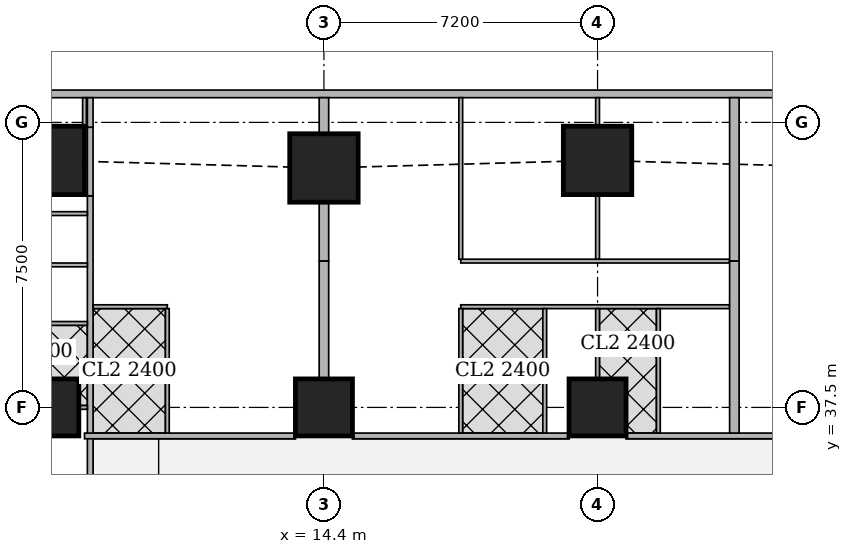
"""IFC4 building model, lengths in metres.
Left out: names, types, materials, properties, quantities, classifications, styles, units other than length and angle.
Written with IfcOpenShell. Run it as: python <this file> out.ifc"""

import sys

from ifc_helpers import new_model, si_unit, direction, frame, frame_2d, origin, origin_2d, place, context, subcontext, project, spatial, rectangle, extrude, element, fill, save


model = new_model("IFC4")
c1 = context("Model", 3, precision=1e-05, world=origin(), true_north=direction((0.0, 1.0)))
c2 = subcontext(c1, "Body", "Model", "MODEL_VIEW")
j1 = project(units=[si_unit("LENGTHUNIT", "METRE"), si_unit("PLANEANGLEUNIT", "RADIAN")], contexts=[c1])
p1 = place(None, origin())
s1 = spatial("IfcSite", under=j1, at=p1, CompositionType="ELEMENT")
p2 = place(p1, origin())
s2 = spatial("IfcBuilding", under=s1, at=p2, CompositionType="ELEMENT")
p3 = place(p2, frame((0.0, 0.0, 147.05)))
s3 = spatial("IfcBuildingStorey", under=s2, at=p3, CompositionType="ELEMENT", Elevation=147.05)
for number, where, z_axis, x_axis in (
    (1, (7.2, 37.5, 0.0), (0.0, 0.0, 1.0), (1.0, 0.0, 0.0)),
    (2, (14.4, 37.5, 0.0), (0.0, 0.0, 1.0), (1.0, 0.0, 0.0)),
    (3, (21.6, 37.5, 0.0), (0.0, 0.0, 1.0), (1.0, 0.0, 0.0)),
):
    element("IfcColumn", number, at=place(p3, frame(where, z_axis=z_axis, x_axis=x_axis)), inside=s3, PredefinedType="COLUMN", context=c2, shape_type="SweptSolid", body=[
        extrude(rectangle(XDim=1.5, YDim=1.5, at=origin_2d()), origin(), (0.0, 0.0, 1.0), 3.75),
    ])
for number, where, z_axis, x_axis in (
    (4, (7.2, 44.0, 0.0), (0.0, 0.0, 1.0), (1.0, 0.0, 0.0)),
    (5, (14.4, 43.8, 0.0), (0.0, 0.0, 1.0), (1.0, 0.0, 0.0)),
    (6, (21.6, 44.0, 0.0), (0.0, 0.0, 1.0), (1.0, 0.0, 0.0)),
):
    element("IfcColumn", number, at=place(p3, frame(where, z_axis=z_axis, x_axis=x_axis)), inside=s3, PredefinedType="COLUMN", context=c2, shape_type="SweptSolid", body=[
        extrude(rectangle(XDim=1.8, YDim=1.8, at=origin_2d()), origin(), (0.0, 0.0, 1.0), 3.75),
    ])
p4 = place(p3, frame((40.106, 45.75, 0.0), z_axis=(0.0, 0.0, 1.0), x_axis=(-1.0, 0.0, 0.0)))
e7 = element("IfcWall", 7, at=p4, inside=s3, PredefinedType="SOLIDWALL", context=c2, shape_type="SweptSolid", body=[
    extrude(rectangle(XDim=37.943, YDim=0.2, at=frame_2d((18.971, 0.0))), origin(), (0.0, 0.0, 1.0), 3.5),
])
p5 = place(p4, frame((8.606, 0.0, 0.9)))
e8 = element("IfcOpeningElement", 8, at=p5, cuts=e7, PredefinedType="OPENING", context=c2, shape_type="SweptSolid", body=[
    extrude(rectangle(XDim=1.8, YDim=1.5, at=frame_2d((0.9, 0.75))), frame((0.0, 0.11, 0.0), z_axis=(0.0, -1.0, 0.0), x_axis=(1.0, 0.0, 0.0)), (0.0, 0.0, 1.0), 0.22),
])
p6 = place(p4, frame((12.206, 0.0, 0.9)))
e9 = element("IfcOpeningElement", 9, at=p6, cuts=e7, PredefinedType="OPENING", context=c2, shape_type="SweptSolid", body=[
    extrude(rectangle(XDim=1.8, YDim=1.5, at=frame_2d((0.9, 0.75))), frame((0.0, 0.11, 0.0), z_axis=(0.0, -1.0, 0.0), x_axis=(1.0, 0.0, 0.0)), (0.0, 0.0, 1.0), 0.22),
])
p7 = place(p4, frame((15.806, 0.0, 0.9)))
e10 = element("IfcOpeningElement", 10, at=p7, cuts=e7, PredefinedType="OPENING", context=c2, shape_type="SweptSolid", body=[
    extrude(rectangle(XDim=1.8, YDim=1.5, at=frame_2d((0.9, 0.75))), frame((0.0, 0.11, 0.0), z_axis=(0.0, -1.0, 0.0), x_axis=(1.0, 0.0, 0.0)), (0.0, 0.0, 1.0), 0.22),
])
p8 = place(p4, frame((19.406, 0.0, 0.9)))
e11 = element("IfcOpeningElement", 11, at=p8, cuts=e7, PredefinedType="OPENING", context=c2, shape_type="SweptSolid", body=[
    extrude(rectangle(XDim=1.8, YDim=1.5, at=frame_2d((0.9, 0.75))), frame((0.0, 0.11, 0.0), z_axis=(0.0, -1.0, 0.0), x_axis=(1.0, 0.0, 0.0)), (0.0, 0.0, 1.0), 0.22),
])
p9 = place(p4, frame((23.006, 0.0, 0.9)))
e12 = element("IfcOpeningElement", 12, at=p9, cuts=e7, PredefinedType="OPENING", context=c2, shape_type="SweptSolid", body=[
    extrude(rectangle(XDim=1.8, YDim=1.5, at=frame_2d((0.9, 0.75))), frame((0.0, 0.11, 0.0), z_axis=(0.0, -1.0, 0.0), x_axis=(1.0, 0.0, 0.0)), (0.0, 0.0, 1.0), 0.22),
])
p10 = place(p4, frame((26.606, 0.0, 0.9)))
e13 = element("IfcOpeningElement", 13, at=p10, cuts=e7, PredefinedType="OPENING", context=c2, shape_type="SweptSolid", body=[
    extrude(rectangle(XDim=1.8, YDim=1.5, at=frame_2d((0.9, 0.75))), frame((0.0, 0.11, 0.0), z_axis=(0.0, -1.0, 0.0), x_axis=(1.0, 0.0, 0.0)), (0.0, 0.0, 1.0), 0.22),
])
p11 = place(p3, frame((8.25, 1.957, 0.0), z_axis=(0.0, 0.0, 1.0), x_axis=(0.0, 1.0, 0.0)))
e14 = element("IfcWall", 14, at=p11, inside=s3, PredefinedType="SOLIDWALL", context=c2, shape_type="SweptSolid", body=[
    extrude(rectangle(XDim=41.111, YDim=0.15, at=frame_2d((20.556, 0.0))), origin(), (0.0, 0.0, 1.0), 3.5),
])
p12 = place(p11, frame((14.418, 0.0, 0.0)))
e15 = element("IfcOpeningElement", 15, at=p12, cuts=e14, PredefinedType="OPENING", context=c2, shape_type="SweptSolid", body=[
    extrude(rectangle(XDim=1.0, YDim=2.1, at=frame_2d((0.5, 1.05))), frame((0.0, 0.085, 0.0), z_axis=(0.0, -1.0, 0.0), x_axis=(1.0, 0.0, 0.0)), (0.0, 0.0, 1.0), 0.17),
])
p13 = place(p11, frame((18.168, 0.0, 0.0)))
e16 = element("IfcOpeningElement", 16, at=p13, cuts=e14, PredefinedType="OPENING", context=c2, shape_type="SweptSolid", body=[
    extrude(rectangle(XDim=1.0, YDim=2.1, at=frame_2d((0.5, 1.05))), frame((0.0, 0.085, 0.0), z_axis=(0.0, -1.0, 0.0), x_axis=(1.0, 0.0, 0.0)), (0.0, 0.0, 1.0), 0.17),
])
p14 = place(p11, frame((33.168, 0.0, 0.0)))
e17 = element("IfcOpeningElement", 17, at=p14, cuts=e14, PredefinedType="OPENING", context=c2, shape_type="SweptSolid", body=[
    extrude(rectangle(XDim=1.0, YDim=2.1, at=frame_2d((0.5, 1.05))), frame((0.0, 0.085, 0.0), z_axis=(0.0, -1.0, 0.0), x_axis=(1.0, 0.0, 0.0)), (0.0, 0.0, 1.0), 0.17),
])
p15 = place(p3, frame((8.25, 43.068, 0.0), z_axis=(0.0, 0.0, 1.0), x_axis=(0.0, 1.0, 0.0)))
e18 = element("IfcWall", 18, at=p15, inside=s3, PredefinedType="SOLIDWALL", context=c2, shape_type="SweptSolid", body=[
    extrude(rectangle(XDim=1.805, YDim=0.15, at=frame_2d((0.902, 0.0))), origin(), (0.0, 0.0, 1.0), 2.1),
])
p16 = place(p3, frame((8.25, 44.873, 0.0), z_axis=(0.0, 0.0, 1.0), x_axis=(0.0, 1.0, 0.0)))
e19 = element("IfcWall", 19, at=p16, inside=s3, PredefinedType="SOLIDWALL", context=c2, shape_type="SweptSolid", body=[
    extrude(rectangle(XDim=0.777, YDim=0.15, at=frame_2d((0.388, 0.0))), origin(), (0.0, 0.0, 1.0), 3.5),
])
p17 = place(p3, frame((8.1, 36.75, 0.0), z_axis=(0.0, 0.0, 1.0), x_axis=(1.0, 0.0, 0.0)))
e20 = element("IfcWall", 20, at=p17, inside=s3, PredefinedType="SOLIDWALL", context=c2, shape_type="SweptSolid", body=[
    extrude(rectangle(XDim=5.549, YDim=0.15, at=frame_2d((2.774, 0.0))), origin(), (0.0, 0.0, 1.0), 3.5),
])
p18 = place(p17, frame((3.739, 0.0, 0.0)))
e21 = element("IfcOpeningElement", 21, at=p18, cuts=e20, PredefinedType="OPENING", context=c2, shape_type="SweptSolid", body=[
    extrude(rectangle(XDim=1.0, YDim=2.1, at=frame_2d((0.5, 1.05))), frame((0.0, 0.085, 0.0), z_axis=(0.0, -1.0, 0.0), x_axis=(1.0, 0.0, 0.0)), (0.0, 0.0, 1.0), 0.17),
])
p19 = place(p3, frame((15.151, 36.75, 0.0), z_axis=(0.0, 0.0, 1.0), x_axis=(1.0, 0.0, 0.0)))
e22 = element("IfcWall", 22, at=p19, inside=s3, PredefinedType="SOLIDWALL", context=c2, shape_type="SweptSolid", body=[
    extrude(rectangle(XDim=5.698, YDim=0.15, at=frame_2d((2.849, 0.0))), origin(), (0.0, 0.0, 1.0), 3.5),
])
p20 = place(p19, frame((0.749, 0.0, 0.0)))
e23 = element("IfcOpeningElement", 23, at=p20, cuts=e22, PredefinedType="OPENING", context=c2, shape_type="SweptSolid", body=[
    extrude(rectangle(XDim=1.0, YDim=2.1, at=frame_2d((0.5, 1.05))), frame((0.0, 0.085, 0.0), z_axis=(0.0, -1.0, 0.0), x_axis=(1.0, 0.0, 0.0)), (0.0, 0.0, 1.0), 0.17),
])
p21 = place(p3, frame((22.351, 36.75, 0.0), z_axis=(0.0, 0.0, 1.0), x_axis=(1.0, 0.0, 0.0)))
e24 = element("IfcWall", 24, at=p21, inside=s3, PredefinedType="SOLIDWALL", context=c2, shape_type="SweptSolid", body=[
    extrude(rectangle(XDim=5.698, YDim=0.15, at=frame_2d((2.849, 0.0))), origin(), (0.0, 0.0, 1.0), 3.5),
])
p22 = place(p21, frame((4.032, 0.0, 0.0)))
e25 = element("IfcOpeningElement", 25, at=p22, cuts=e24, PredefinedType="OPENING", context=c2, shape_type="SweptSolid", body=[
    extrude(rectangle(XDim=1.0, YDim=2.1, at=frame_2d((0.5, 1.05))), frame((0.0, 0.085, 0.0), z_axis=(0.0, -1.0, 0.0), x_axis=(1.0, 0.0, 0.0)), (0.0, 0.0, 1.0), 0.17),
])
p23 = place(p3, frame((8.1, 45.65, 0.0), z_axis=(0.0, 0.0, 1.0), x_axis=(0.0, -1.0, 0.0)))
e26 = element("IfcWall", 26, at=p23, inside=s3, PredefinedType="PARTITIONING", context=c2, shape_type="SweptSolid", body=[
    extrude(rectangle(XDim=0.749, YDim=0.1, at=frame_2d((0.375, 0.0))), origin(), (0.0, 0.0, 1.0), 3.5),
])
p24 = place(p3, frame((7.951, 37.5, 0.0), z_axis=(0.0, 0.0, 1.0), x_axis=(1.0, 0.0, 0.0)))
e27 = element("IfcWall", 27, at=p24, inside=s3, PredefinedType="PARTITIONING", context=c2, shape_type="SweptSolid", body=[
    extrude(rectangle(XDim=0.224, YDim=0.1, at=frame_2d((0.112, 0.0))), origin(), (0.0, 0.0, 1.0), 3.5),
])
for number, where, z_axis, x_axis in (
    (28, (4.9, 41.25, 0.0), (0.0, 0.0, 1.0), (1.0, 0.0, 0.0)),
    (29, (4.9, 39.71, 0.0), (0.0, 0.0, 1.0), (1.0, 0.0, 0.0)),
):
    element("IfcWall", number, at=place(p3, frame(where, z_axis=z_axis, x_axis=x_axis)), inside=s3, PredefinedType="PARTITIONING", context=c2, shape_type="SweptSolid", body=[
        extrude(rectangle(XDim=3.275, YDim=0.1, at=frame_2d((1.638, 0.0))), origin(), (0.0, 0.0, 1.0), 3.5),
    ])
p25 = place(p3, frame((8.325, 40.15, 0.0), z_axis=(0.0, 0.0, 1.0), x_axis=(1.0, 0.0, 0.0)))
e30 = element("IfcWall", 30, at=p25, inside=s3, PredefinedType="PARTITIONING", context=c2, shape_type="SweptSolid", body=[
    extrude(rectangle(XDim=1.954, YDim=0.1, at=frame_2d((0.977, 0.0))), origin(), (0.0, 0.0, 1.0), 3.5),
])
p26 = place(p25, frame((0.475, 0.0, 0.0)))
e31 = element("IfcOpeningElement", 31, at=p26, cuts=e30, PredefinedType="OPENING", context=c2, shape_type="SweptSolid", body=[
    extrude(rectangle(XDim=0.9, YDim=2.1, at=frame_2d((0.45, 1.05))), frame((0.0, 0.06, 0.0), z_axis=(0.0, -1.0, 0.0), x_axis=(1.0, 0.0, 0.0)), (0.0, 0.0, 1.0), 0.12),
])
p27 = place(p3, frame((10.279, 36.825, 0.0), z_axis=(0.0, 0.0, 1.0), x_axis=(0.0, 1.0, 0.0)))
e32 = element("IfcWall", 32, at=p27, inside=s3, PredefinedType="PARTITIONING", context=c2, shape_type="SweptSolid", body=[
    extrude(rectangle(XDim=3.275, YDim=0.1, at=frame_2d((1.638, 0.0))), origin(), (0.0, 0.0, 1.0), 3.5),
])
p28 = place(p3, frame((18.0, 41.35, 0.0), z_axis=(0.0, 0.0, 1.0), x_axis=(1.0, 0.0, 0.0)))
e33 = element("IfcWall", 33, at=p28, inside=s3, PredefinedType="PARTITIONING", context=c2, shape_type="SweptSolid", body=[
    extrude(rectangle(XDim=7.075, YDim=0.1, at=frame_2d((3.538, 0.0))), origin(), (0.0, 0.0, 1.0), 3.5),
])
p29 = place(p28, frame((0.2, 0.0, 0.0)))
e34 = element("IfcOpeningElement", 34, at=p29, cuts=e33, PredefinedType="OPENING", context=c2, shape_type="SweptSolid", body=[
    extrude(rectangle(XDim=0.9, YDim=2.1, at=frame_2d((0.45, 1.05))), frame((0.0, 0.06, 0.0), z_axis=(0.0, -1.0, 0.0), x_axis=(1.0, 0.0, 0.0)), (0.0, 0.0, 1.0), 0.12),
])
p30 = place(p28, frame((3.8, 0.0, 0.0)))
e35 = element("IfcOpeningElement", 35, at=p30, cuts=e33, PredefinedType="OPENING", context=c2, shape_type="SweptSolid", body=[
    extrude(rectangle(XDim=0.9, YDim=2.1, at=frame_2d((0.45, 1.05))), frame((0.0, 0.06, 0.0), z_axis=(0.0, -1.0, 0.0), x_axis=(1.0, 0.0, 0.0)), (0.0, 0.0, 1.0), 0.12),
])
p31 = place(p3, frame((18.0, 40.15, 0.0), z_axis=(0.0, 0.0, 1.0), x_axis=(1.0, 0.0, 0.0)))
e36 = element("IfcWall", 36, at=p31, inside=s3, PredefinedType="PARTITIONING", context=c2, shape_type="SweptSolid", body=[
    extrude(rectangle(XDim=7.075, YDim=0.1, at=frame_2d((3.538, 0.0))), origin(), (0.0, 0.0, 1.0), 3.5),
])
p32 = place(p31, frame((0.655, 0.0, 0.0)))
e37 = element("IfcOpeningElement", 37, at=p32, cuts=e36, PredefinedType="OPENING", context=c2, shape_type="SweptSolid", body=[
    extrude(rectangle(XDim=0.9, YDim=2.1, at=frame_2d((0.45, 1.05))), frame((0.0, 0.06, 0.0), z_axis=(0.0, -1.0, 0.0), x_axis=(1.0, 0.0, 0.0)), (0.0, 0.0, 1.0), 0.12),
])
p33 = place(p31, frame((3.95, 0.0, 0.0)))
e38 = element("IfcOpeningElement", 38, at=p33, cuts=e36, PredefinedType="OPENING", context=c2, shape_type="SweptSolid", body=[
    extrude(rectangle(XDim=0.9, YDim=2.1, at=frame_2d((0.45, 1.05))), frame((0.0, 0.06, 0.0), z_axis=(0.0, -1.0, 0.0), x_axis=(1.0, 0.0, 0.0)), (0.0, 0.0, 1.0), 0.12),
])
p34 = place(p31, frame((2.455, 0.0, 0.0)))
e39 = element("IfcOpeningElement", 39, at=p34, cuts=e36, PredefinedType="OPENING", context=c2, shape_type="SweptSolid", body=[
    extrude(rectangle(XDim=0.9, YDim=2.1, at=frame_2d((0.45, 1.05))), frame((0.0, 0.06, 0.0), z_axis=(0.0, -1.0, 0.0), x_axis=(1.0, 0.0, 0.0)), (0.0, 0.0, 1.0), 0.12),
])
p35 = place(p31, frame((5.75, 0.0, 0.0)))
e40 = element("IfcOpeningElement", 40, at=p35, cuts=e36, PredefinedType="OPENING", context=c2, shape_type="SweptSolid", body=[
    extrude(rectangle(XDim=0.9, YDim=2.1, at=frame_2d((0.45, 1.05))), frame((0.0, 0.06, 0.0), z_axis=(0.0, -1.0, 0.0), x_axis=(1.0, 0.0, 0.0)), (0.0, 0.0, 1.0), 0.12),
])
p36 = place(p3, frame((18.0, 41.4, 0.0), z_axis=(0.0, 0.0, 1.0), x_axis=(0.0, 1.0, 0.0)))
e41 = element("IfcWall", 41, at=p36, inside=s3, PredefinedType="PARTITIONING", context=c2, shape_type="SweptSolid", body=[
    extrude(rectangle(XDim=4.25, YDim=0.1, at=frame_2d((2.125, 0.0))), origin(), (0.0, 0.0, 1.0), 2.1),
])
p37 = place(p3, frame((21.6, 41.4, 0.0), z_axis=(0.0, 0.0, 1.0), x_axis=(0.0, 1.0, 0.0)))
e42 = element("IfcWall", 42, at=p37, inside=s3, PredefinedType="PARTITIONING", context=c2, shape_type="SweptSolid", body=[
    extrude(rectangle(XDim=1.699, YDim=0.1, at=frame_2d((0.85, 0.0))), origin(), (0.0, 0.0, 1.0), 3.5),
])
p38 = place(p3, frame((21.6, 44.901, 0.0), z_axis=(0.0, 0.0, 1.0), x_axis=(0.0, 1.0, 0.0)))
e43 = element("IfcWall", 43, at=p38, inside=s3, PredefinedType="PARTITIONING", context=c2, shape_type="SweptSolid", body=[
    extrude(rectangle(XDim=0.749, YDim=0.1, at=frame_2d((0.375, 0.0))), origin(), (0.0, 0.0, 1.0), 3.5),
])
p39 = place(p3, frame((18.0, 36.825, 0.0), z_axis=(0.0, 0.0, 1.0), x_axis=(0.0, 1.0, 0.0)))
e44 = element("IfcWall", 44, at=p39, inside=s3, PredefinedType="PARTITIONING", context=c2, shape_type="SweptSolid", body=[
    extrude(rectangle(XDim=3.275, YDim=0.1, at=frame_2d((1.638, 0.0))), origin(), (0.0, 0.0, 1.0), 3.5),
])
p40 = place(p3, frame((21.6, 38.251, 0.0), z_axis=(0.0, 0.0, 1.0), x_axis=(0.0, 1.0, 0.0)))
e45 = element("IfcWall", 45, at=p40, inside=s3, PredefinedType="PARTITIONING", context=c2, shape_type="SweptSolid", body=[
    extrude(rectangle(XDim=1.849, YDim=0.1, at=frame_2d((0.925, 0.0))), origin(), (0.0, 0.0, 1.0), 3.5),
])
for number, where, z_axis, x_axis in (
    (46, (20.21, 36.825, 0.0), (0.0, 0.0, 1.0), (0.0, 1.0, 0.0)),
    (47, (23.2, 36.825, 0.0), (0.0, 0.0, 1.0), (0.0, 1.0, 0.0)),
):
    element("IfcWall", number, at=place(p3, frame(where, z_axis=z_axis, x_axis=x_axis)), inside=s3, PredefinedType="PARTITIONING", context=c2, shape_type="SweptSolid", body=[
        extrude(rectangle(XDim=3.275, YDim=0.1, at=frame_2d((1.638, 0.0))), origin(), (0.0, 0.0, 1.0), 3.5),
    ])
p41 = place(p3, frame((14.4, 41.35, 0.0), z_axis=(0.0, 0.0, 1.0), x_axis=(0.0, 1.0, 0.0)))
e48 = element("IfcWall", 48, at=p41, inside=s3, PredefinedType="SOLIDWALL", context=c2, shape_type="SweptSolid", body=[
    extrude(rectangle(XDim=1.549, YDim=0.25, at=frame_2d((0.774, 0.0))), origin(), (0.0, 0.0, 1.0), 2.1),
])
p42 = place(p3, frame((14.4, 44.701, 0.0), z_axis=(0.0, 0.0, 1.0), x_axis=(0.0, 1.0, 0.0)))
e49 = element("IfcWall", 49, at=p42, inside=s3, PredefinedType="SOLIDWALL", context=c2, shape_type="SweptSolid", body=[
    extrude(rectangle(XDim=0.949, YDim=0.25, at=frame_2d((0.475, 0.0))), origin(), (0.0, 0.0, 1.0), 2.1),
])
p43 = place(p3, frame((14.4, 38.251, 0.0), z_axis=(0.0, 0.0, 1.0), x_axis=(0.0, 1.0, 0.0)))
e50 = element("IfcWall", 50, at=p43, inside=s3, PredefinedType="SOLIDWALL", context=c2, shape_type="SweptSolid", body=[
    extrude(rectangle(XDim=3.099, YDim=0.25, at=frame_2d((1.55, 0.0))), origin(), (0.0, 0.0, 1.0), 3.5),
])
p44 = place(p3, frame((25.2, 41.35, 0.0), z_axis=(0.0, 0.0, 1.0), x_axis=(0.0, 1.0, 0.0)))
e51 = element("IfcWall", 51, at=p44, inside=s3, PredefinedType="SOLIDWALL", context=c2, shape_type="SweptSolid", body=[
    extrude(rectangle(XDim=4.3, YDim=0.25, at=frame_2d((2.15, 0.0))), origin(), (0.0, 0.0, 1.0), 2.1),
])
p45 = place(p3, frame((25.2, 36.825, 0.0), z_axis=(0.0, 0.0, 1.0), x_axis=(0.0, 1.0, 0.0)))
e52 = element("IfcWall", 52, at=p45, inside=s3, PredefinedType="SOLIDWALL", context=c2, shape_type="SweptSolid", body=[
    extrude(rectangle(XDim=4.525, YDim=0.25, at=frame_2d((2.263, 0.0))), origin(), (0.0, 0.0, 1.0), 3.5),
])
p46 = place(p3, frame((5.403, 42.6, 0.0), z_axis=(0.0, 0.0, 1.0), x_axis=(1.0, 0.0, 0.0)))
e53 = element("IfcWall", 53, at=p46, inside=s3, PredefinedType="PARTITIONING", context=c2, shape_type="SweptSolid", body=[
    extrude(rectangle(XDim=2.772, YDim=0.1, at=frame_2d((1.386, 0.0))), origin(), (0.0, 0.0, 1.0), 3.5),
])
p47 = place(p46, frame((0.15, 0.0, 0.0)))
e54 = element("IfcOpeningElement", 54, at=p47, cuts=e53, PredefinedType="OPENING", context=c2, shape_type="SweptSolid", body=[
    extrude(rectangle(XDim=0.9, YDim=2.1, at=frame_2d((0.45, 1.05))), frame((0.0, 0.06, 0.0), z_axis=(0.0, -1.0, 0.0), x_axis=(1.0, 0.0, 0.0)), (0.0, 0.0, 1.0), 0.12),
])
p48 = place(p6, origin())
e55 = element("IfcWindow", 55, at=p48, inside=s3, PartitioningType="SINGLE_PANEL", PredefinedType="WINDOW", context=c2, shape_type="SweptSolid", body=[
    extrude(rectangle(XDim=1.8, YDim=1.5, at=frame_2d((0.9, 0.75))), frame((0.0, 0.03, 0.0), z_axis=(0.0, -1.0, 0.0), x_axis=(1.0, 0.0, 0.0)), (0.0, 0.0, 1.0), 0.06),
])
fill(e9, e55)
p49 = place(p7, origin())
e56 = element("IfcWindow", 56, at=p49, inside=s3, PartitioningType="SINGLE_PANEL", PredefinedType="WINDOW", context=c2, shape_type="SweptSolid", body=[
    extrude(rectangle(XDim=1.8, YDim=1.5, at=frame_2d((0.9, 0.75))), frame((0.0, 0.03, 0.0), z_axis=(0.0, -1.0, 0.0), x_axis=(1.0, 0.0, 0.0)), (0.0, 0.0, 1.0), 0.06),
])
fill(e10, e56)
p50 = place(p8, origin())
e57 = element("IfcWindow", 57, at=p50, inside=s3, PartitioningType="SINGLE_PANEL", PredefinedType="WINDOW", context=c2, shape_type="SweptSolid", body=[
    extrude(rectangle(XDim=1.8, YDim=1.5, at=frame_2d((0.9, 0.75))), frame((0.0, 0.03, 0.0), z_axis=(0.0, -1.0, 0.0), x_axis=(1.0, 0.0, 0.0)), (0.0, 0.0, 1.0), 0.06),
])
fill(e11, e57)
p51 = place(p9, origin())
e58 = element("IfcWindow", 58, at=p51, inside=s3, PartitioningType="SINGLE_PANEL", PredefinedType="WINDOW", context=c2, shape_type="SweptSolid", body=[
    extrude(rectangle(XDim=1.8, YDim=1.5, at=frame_2d((0.9, 0.75))), frame((0.0, 0.03, 0.0), z_axis=(0.0, -1.0, 0.0), x_axis=(1.0, 0.0, 0.0)), (0.0, 0.0, 1.0), 0.06),
])
fill(e12, e58)
p52 = place(p10, origin())
e59 = element("IfcWindow", 59, at=p52, inside=s3, PartitioningType="SINGLE_PANEL", PredefinedType="WINDOW", context=c2, shape_type="SweptSolid", body=[
    extrude(rectangle(XDim=1.8, YDim=1.5, at=frame_2d((0.9, 0.75))), frame((0.0, 0.03, 0.0), z_axis=(0.0, -1.0, 0.0), x_axis=(1.0, 0.0, 0.0)), (0.0, 0.0, 1.0), 0.06),
])
fill(e13, e59)
p53 = place(p14, origin())
e60 = element("IfcDoor", 60, at=p53, inside=s3, OperationType="SINGLE_SWING_RIGHT", PredefinedType="DOOR", context=c2, shape_type="SweptSolid", body=[
    extrude(rectangle(XDim=1.0, YDim=2.1, at=frame_2d((0.5, 1.05))), frame((0.0, 0.025, 0.0), z_axis=(0.0, -1.0, 0.0), x_axis=(1.0, 0.0, 0.0)), (0.0, 0.0, 1.0), 0.05),
])
fill(e17, e60)
p54 = place(p26, origin())
e61 = element("IfcDoor", 61, at=p54, inside=s3, OperationType="SINGLE_SWING_RIGHT", PredefinedType="DOOR", context=c2, shape_type="SweptSolid", body=[
    extrude(rectangle(XDim=0.9, YDim=2.1, at=frame_2d((0.45, 1.05))), frame((0.0, 0.025, 0.0), z_axis=(0.0, -1.0, 0.0), x_axis=(1.0, 0.0, 0.0)), (0.0, 0.0, 1.0), 0.05),
])
fill(e31, e61)
p55 = place(p18, origin())
e62 = element("IfcDoor", 62, at=p55, inside=s3, OperationType="SINGLE_SWING_RIGHT", PredefinedType="DOOR", context=c2, shape_type="SweptSolid", body=[
    extrude(rectangle(XDim=1.0, YDim=2.1, at=frame_2d((0.5, 1.05))), frame((0.0, 0.025, 0.0), z_axis=(0.0, -1.0, 0.0), x_axis=(1.0, 0.0, 0.0)), (0.0, 0.0, 1.0), 0.05),
])
fill(e21, e62)
p56 = place(p29, origin())
e63 = element("IfcDoor", 63, at=p56, inside=s3, OperationType="SINGLE_SWING_LEFT", PredefinedType="DOOR", context=c2, shape_type="SweptSolid", body=[
    extrude(rectangle(XDim=0.9, YDim=2.1, at=frame_2d((0.45, 1.05))), frame((0.0, 0.025, 0.0), z_axis=(0.0, -1.0, 0.0), x_axis=(1.0, 0.0, 0.0)), (0.0, 0.0, 1.0), 0.05),
])
fill(e34, e63)
p57 = place(p30, origin())
e64 = element("IfcDoor", 64, at=p57, inside=s3, OperationType="SINGLE_SWING_LEFT", PredefinedType="DOOR", context=c2, shape_type="SweptSolid", body=[
    extrude(rectangle(XDim=0.9, YDim=2.1, at=frame_2d((0.45, 1.05))), frame((0.0, 0.025, 0.0), z_axis=(0.0, -1.0, 0.0), x_axis=(1.0, 0.0, 0.0)), (0.0, 0.0, 1.0), 0.05),
])
fill(e35, e64)
p58 = place(p32, origin())
e65 = element("IfcDoor", 65, at=p58, inside=s3, OperationType="SINGLE_SWING_RIGHT", PredefinedType="DOOR", context=c2, shape_type="SweptSolid", body=[
    extrude(rectangle(XDim=0.9, YDim=2.1, at=frame_2d((0.45, 1.05))), frame((0.0, 0.025, 0.0), z_axis=(0.0, -1.0, 0.0), x_axis=(1.0, 0.0, 0.0)), (0.0, 0.0, 1.0), 0.05),
])
fill(e37, e65)
p59 = place(p33, origin())
e66 = element("IfcDoor", 66, at=p59, inside=s3, OperationType="SINGLE_SWING_RIGHT", PredefinedType="DOOR", context=c2, shape_type="SweptSolid", body=[
    extrude(rectangle(XDim=0.9, YDim=2.1, at=frame_2d((0.45, 1.05))), frame((0.0, 0.025, 0.0), z_axis=(0.0, -1.0, 0.0), x_axis=(1.0, 0.0, 0.0)), (0.0, 0.0, 1.0), 0.05),
])
fill(e38, e66)
p60 = place(p34, origin())
e67 = element("IfcDoor", 67, at=p60, inside=s3, OperationType="SINGLE_SWING_RIGHT", PredefinedType="DOOR", context=c2, shape_type="SweptSolid", body=[
    extrude(rectangle(XDim=0.9, YDim=2.1, at=frame_2d((0.45, 1.05))), frame((0.0, 0.025, 0.0), z_axis=(0.0, -1.0, 0.0), x_axis=(1.0, 0.0, 0.0)), (0.0, 0.0, 1.0), 0.05),
])
fill(e39, e67)
p61 = place(p35, origin())
e68 = element("IfcDoor", 68, at=p61, inside=s3, OperationType="SINGLE_SWING_LEFT", PredefinedType="DOOR", context=c2, shape_type="SweptSolid", body=[
    extrude(rectangle(XDim=0.9, YDim=2.1, at=frame_2d((0.45, 1.05))), frame((0.0, 0.025, 0.0), z_axis=(0.0, -1.0, 0.0), x_axis=(1.0, 0.0, 0.0)), (0.0, 0.0, 1.0), 0.05),
])
fill(e40, e68)
p62 = place(p20, origin())
e69 = element("IfcDoor", 69, at=p62, inside=s3, OperationType="SINGLE_SWING_LEFT", PredefinedType="DOOR", context=c2, shape_type="SweptSolid", body=[
    extrude(rectangle(XDim=1.0, YDim=2.1, at=frame_2d((0.5, 1.05))), frame((0.0, 0.025, 0.0), z_axis=(0.0, -1.0, 0.0), x_axis=(1.0, 0.0, 0.0)), (0.0, 0.0, 1.0), 0.05),
])
fill(e23, e69)
save(model, sys.argv[1])
